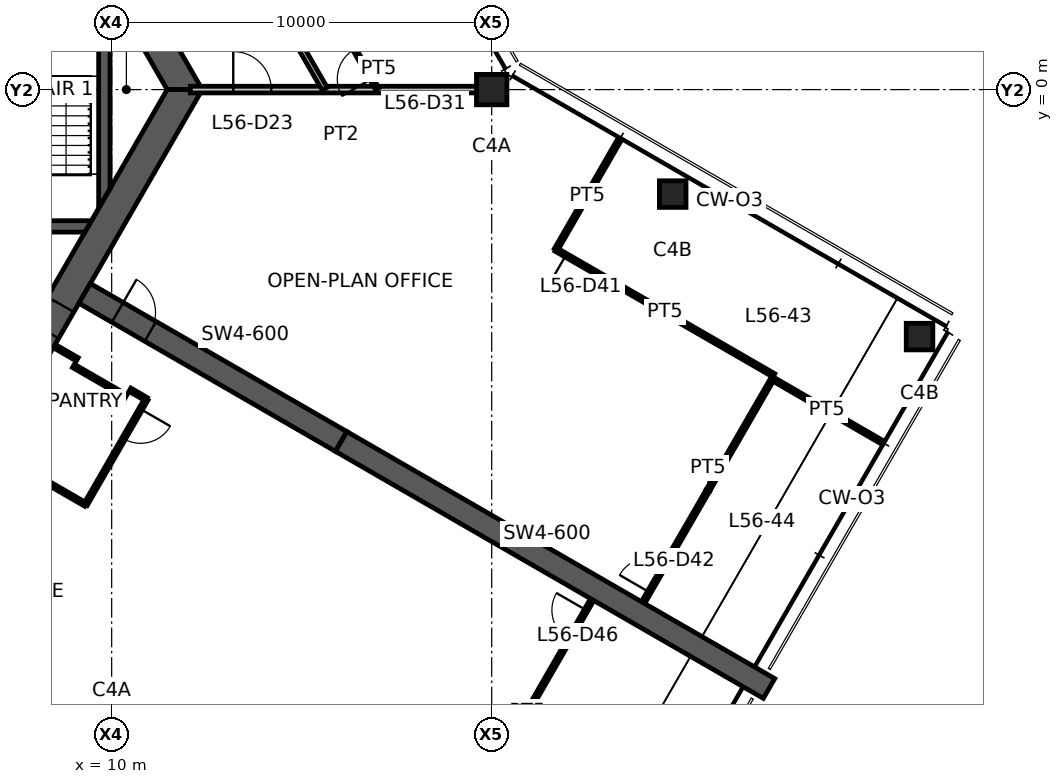
"""IFC4 building model, lengths in metres.
Left out: names, types, materials, properties, quantities, classifications, styles, units other than length and angle.
Written with IfcOpenShell. Run it as: python <this file> out.ifc"""

import sys

from ifc_helpers import new_model, si_unit, direction, frame, frame_2d, origin, origin_2d, place, context, subcontext, project, spatial, polyline, rectangle, hollow_rectangle, outline, extrude, element, fill, save


model = new_model("IFC4")
c1 = context("Model", 3, precision=1e-05, world=origin(), true_north=direction((0.0, 1.0)))
c2 = subcontext(c1, "Body", "Model", "MODEL_VIEW")
j1 = project(units=[si_unit("LENGTHUNIT", "METRE"), si_unit("PLANEANGLEUNIT", "RADIAN")], contexts=[c1])
p1 = place(None, origin())
s1 = spatial("IfcSite", under=j1, at=p1, CompositionType="ELEMENT")
p2 = place(p1, origin())
s2 = spatial("IfcBuilding", under=s1, at=p2, CompositionType="ELEMENT")
p3 = place(p2, frame((0.0, 0.0, 224.5)))
s3 = spatial("IfcBuildingStorey", under=s2, at=p3, CompositionType="ELEMENT", Elevation=224.5)
p4 = place(p3, frame((20.0, 0.0, 0.0), z_axis=(0.0, 0.0, 1.0), x_axis=(1.0, 0.0, 0.0)))
e1 = element("IfcColumn", 1, at=p4, inside=s3, PredefinedType="COLUMN", context=c2, shape_type="SweptSolid", body=[
    extrude(hollow_rectangle(XDim=0.8, YDim=0.8, WallThickness=0.04, at=origin_2d()), origin(), (0.0, 0.0, 1.0), 3.9),
])
for number, where, z_axis, x_axis in (
    (2, (24.763, -2.75, 0.0), (0.0, 0.0, 1.0), (1.0, 0.0, 0.0)),
    (3, (31.258, -6.5, 0.0), (0.0, 0.0, 1.0), (1.0, 0.0, 0.0)),
):
    element("IfcColumn", number, at=place(p3, frame(where, z_axis=z_axis, x_axis=x_axis)), inside=s3, PredefinedType="COLUMN", context=c2, shape_type="SweptSolid", body=[
        extrude(hollow_rectangle(XDim=0.7, YDim=0.7, WallThickness=0.032, at=origin_2d()), origin(), (0.0, 0.0, 1.0), 3.9),
    ])
p5 = place(p3, frame((11.922, 0.0, 0.0), z_axis=(0.0, 0.0, 1.0), x_axis=(-0.500004296715, 0.866022923061, 0.0)))
e4 = element("IfcWall", 4, at=p5, inside=s3, PredefinedType="SHEAR", context=c2, shape_type="SweptSolid", body=[
    extrude(outline(polyline([(-0.231, -0.4), (5.835, -0.4), (6.635, -0.4), (12.153, -0.4), (11.691, 0.4), (6.635, 0.4), (5.835, 0.4), (0.231, 0.4), (-0.231, -0.4)])), origin(), (0.0, 0.0, 1.0), 3.9),
])
p6 = place(p5, frame((5.835, 0.0, 0.0)))
e5 = element("IfcOpeningElement", 5, at=p6, cuts=e4, PredefinedType="OPENING", context=c2, shape_type="SweptSolid", body=[
    extrude(rectangle(XDim=0.8, YDim=2.1, at=frame_2d((0.4, 1.05))), frame((0.0, 0.41, 0.0), z_axis=(0.0, -1.0, 0.0), x_axis=(1.0, 0.0, 0.0)), (0.0, 0.0, 1.0), 0.82),
])
p7 = place(p3, frame((5.961, -10.325, 0.0), z_axis=(0.0, 0.0, 1.0), x_axis=(0.500004296715, 0.866022923061, 0.0)))
e6 = element("IfcWall", 6, at=p7, inside=s3, PredefinedType="SHEAR", context=c2, shape_type="SweptSolid", body=[
    extrude(outline(polyline([(-0.231, -0.4), (4.594, -0.4), (5.394, -0.4), (12.153, -0.4), (11.691, 0.4), (5.394, 0.4), (4.594, 0.4), (0.231, 0.4), (-0.231, -0.4)])), origin(), (0.0, 0.0, 1.0), 3.9),
])
p8 = place(p7, frame((4.594, 0.0, 0.0)))
e7 = element("IfcOpeningElement", 7, at=p8, cuts=e6, PredefinedType="OPENING", context=c2, shape_type="SweptSolid", body=[
    extrude(rectangle(XDim=0.8, YDim=2.1, at=frame_2d((0.4, 1.05))), frame((0.0, 0.41, 0.0), z_axis=(0.0, -1.0, 0.0), x_axis=(1.0, 0.0, 0.0)), (0.0, 0.0, 1.0), 0.82),
])
p9 = place(p3, frame((9.288, -5.363, 0.0), z_axis=(0.0, 0.0, 1.0), x_axis=(0.866031736626, -0.499989031036, 0.0)))
e8 = element("IfcWall", 8, at=p9, inside=s3, PredefinedType="SHEAR", context=c2, shape_type="SweptSolid", body=[
    extrude(rectangle(XDim=7.796, YDim=0.6, at=frame_2d((3.898, 0.0))), origin(), (0.0, 0.0, 1.0), 3.9),
])
p10 = place(p9, frame((1.0, 0.0, 0.0)))
e9 = element("IfcOpeningElement", 9, at=p10, cuts=e8, PredefinedType="OPENING", context=c2, shape_type="SweptSolid", body=[
    extrude(rectangle(XDim=1.0, YDim=2.1, at=frame_2d((0.5, 1.05))), frame((0.0, 0.31, 0.0), z_axis=(0.0, -1.0, 0.0), x_axis=(1.0, 0.0, 0.0)), (0.0, 0.0, 1.0), 0.62),
])
p11 = place(p3, frame((16.039, -9.26, 0.0), z_axis=(0.0, 0.0, 1.0), x_axis=(0.866024837091, -0.50000098154, 0.0)))
e10 = element("IfcWall", 10, at=p11, inside=s3, PredefinedType="SHEAR", context=c2, shape_type="SweptSolid", body=[
    extrude(rectangle(XDim=13.0, YDim=0.6, at=frame_2d((6.5, 0.0))), origin(), (0.0, 0.0, 1.0), 3.9),
])
p12 = place(p3, frame((1.45, -3.6, 0.0), z_axis=(0.0, 0.0, 1.0), x_axis=(1.0, 0.0, 0.0)))
e11 = element("IfcWall", 11, at=p12, inside=s3, PredefinedType="SHEAR", context=c2, shape_type="SweptSolid", body=[
    extrude(outline(polyline([(0.0, -0.15), (1.05, -0.15), (2.15, -0.15), (7.845, -0.15), (8.019, 0.15), (2.15, 0.15), (1.05, 0.15), (0.0, 0.15), (0.0, -0.15)])), origin(), (0.0, 0.0, 1.0), 3.9),
])
p13 = place(p12, frame((1.05, 0.0, 0.0)))
e12 = element("IfcOpeningElement", 12, at=p13, cuts=e11, PredefinedType="OPENING", context=c2, shape_type="SweptSolid", body=[
    extrude(rectangle(XDim=1.1, YDim=2.1, at=frame_2d((0.55, 1.05))), frame((0.0, 0.16, 0.0), z_axis=(0.0, -1.0, 0.0), x_axis=(1.0, 0.0, 0.0)), (0.0, 0.0, 1.0), 0.32),
])
p14 = place(p3, frame((9.808, -2.862, 0.0), z_axis=(0.0, 0.0, 1.0), x_axis=(0.0, 1.0, 0.0)))
e13 = element("IfcWall", 13, at=p14, inside=s3, PredefinedType="SHEAR", context=c2, shape_type="SweptSolid", body=[
    extrude(outline(polyline([(0.26, -0.15), (5.465, -0.15), (5.984, 0.15), (-0.26, 0.15), (0.26, -0.15)])), origin(), (0.0, 0.0, 1.0), 3.9),
])
p15 = place(p3, frame((12.07, 0.0, 0.0), z_axis=(0.0, 0.0, 1.0), x_axis=(1.0, 0.0, 0.0)))
e14 = element("IfcWall", 14, at=p15, inside=s3, PredefinedType="PARTITIONING", context=c2, shape_type="SweptSolid", body=[
    extrude(rectangle(XDim=7.93, YDim=0.175, at=frame_2d((3.965, 0.0))), origin(), (0.0, 0.0, 1.0), 3.05),
])
p16 = place(p15, frame((1.13, 0.0, 0.0)))
e15 = element("IfcOpeningElement", 15, at=p16, cuts=e14, PredefinedType="OPENING", context=c2, shape_type="SweptSolid", body=[
    extrude(rectangle(XDim=1.0, YDim=2.1, at=frame_2d((0.5, 1.05))), frame((0.0, 0.098, 0.0), z_axis=(0.0, -1.0, 0.0), x_axis=(1.0, 0.0, 0.0)), (0.0, 0.0, 1.0), 0.195),
])
p17 = place(p3, frame((11.011, 7.979, 0.0), z_axis=(0.0, 0.0, 1.0), x_axis=(0.49999917462, -0.866025880317, 0.0)))
e16 = element("IfcWall", 16, at=p17, inside=s3, PredefinedType="PARTITIONING", context=c2, shape_type="SweptSolid", body=[
    extrude(rectangle(XDim=9.19, YDim=0.15, at=frame_2d((4.595, 0.0))), origin(), (0.0, 0.0, 1.0), 2.95),
])
p18 = place(p17, frame((4.095, 0.0, 0.0)))
e17 = element("IfcOpeningElement", 17, at=p18, cuts=e16, PredefinedType="OPENING", context=c2, shape_type="SweptSolid", body=[
    extrude(rectangle(XDim=1.0, YDim=2.1, at=frame_2d((0.5, 1.05))), frame((0.0, 0.085, 0.0), z_axis=(0.0, -1.0, 0.0), x_axis=(1.0, 0.0, 0.0)), (0.0, 0.0, 1.0), 0.17),
])
p19 = place(p3, frame((16.986, 0.02, 0.0), z_axis=(0.0, 0.0, 1.0), x_axis=(-0.498096123952, 0.867121820337, 0.0)))
e18 = element("IfcWall", 18, at=p19, inside=s3, PredefinedType="PARTITIONING", context=c2, shape_type="SweptSolid", body=[
    extrude(rectangle(XDim=2.067, YDim=0.1, at=frame_2d((1.034, 0.0))), origin(), (0.0, 0.0, 1.0), 2.95),
])
p20 = place(p19, frame((0.3, 0.0, 0.0)))
e19 = element("IfcOpeningElement", 19, at=p20, cuts=e18, PredefinedType="OPENING", context=c2, shape_type="SweptSolid", body=[
    extrude(rectangle(XDim=0.9, YDim=2.1, at=frame_2d((0.45, 1.05))), frame((0.0, 0.06, 0.0), z_axis=(0.0, -1.0, 0.0), x_axis=(1.0, 0.0, 0.0)), (0.0, 0.0, 1.0), 0.12),
])
p21 = place(p3, frame((30.25, -9.266, 0.0), z_axis=(0.0, 0.0, 1.0), x_axis=(-0.865342122637, 0.501181614577, 0.0)))
e20 = element("IfcWall", 20, at=p21, inside=s3, PredefinedType="PARTITIONING", context=c2, shape_type="SweptSolid", body=[
    extrude(rectangle(XDim=3.311, YDim=0.1, at=frame_2d((1.655, 0.0))), origin(), (0.0, 0.0, 1.0), 2.95),
])
p22 = place(p3, frame((21.692, -4.21, 0.0), z_axis=(0.0, 0.0, 1.0), x_axis=(0.50002956483, 0.866008333849, 0.0)))
e21 = element("IfcWall", 21, at=p22, inside=s3, PredefinedType="PARTITIONING", context=c2, shape_type="SweptSolid", body=[
    extrude(rectangle(XDim=3.28, YDim=0.1, at=frame_2d((1.64, 0.0))), origin(), (0.0, 0.0, 1.0), 2.95),
])
p23 = place(p3, frame((27.425, -7.52, 0.0), z_axis=(0.0, 0.0, 1.0), x_axis=(-0.866030817826, 0.499990622488, 0.0)))
e22 = element("IfcWall", 22, at=p23, inside=s3, PredefinedType="PARTITIONING", context=c2, shape_type="SweptSolid", body=[
    extrude(rectangle(XDim=6.62, YDim=0.1, at=frame_2d((3.31, 0.0))), origin(), (0.0, 0.0, 1.0), 2.95),
])
p24 = place(p23, frame((5.42, 0.0, 0.0)))
e23 = element("IfcOpeningElement", 23, at=p24, cuts=e22, PredefinedType="OPENING", context=c2, shape_type="SweptSolid", body=[
    extrude(rectangle(XDim=0.9, YDim=2.1, at=frame_2d((0.45, 1.05))), frame((0.0, 0.06, 0.0), z_axis=(0.0, -1.0, 0.0), x_axis=(1.0, 0.0, 0.0)), (0.0, 0.0, 1.0), 0.12),
])
p25 = place(p3, frame((23.993, -13.483, 0.0), z_axis=(0.0, 0.0, 1.0), x_axis=(0.500522347083, 0.865723616445, 0.0)))
e24 = element("IfcWall", 24, at=p25, inside=s3, PredefinedType="PARTITIONING", context=c2, shape_type="SweptSolid", body=[
    extrude(rectangle(XDim=6.78, YDim=0.1, at=frame_2d((3.39, 0.0))), origin(), (0.0, 0.0, 1.0), 2.95),
])
p26 = place(p25, frame((0.3, 0.0, 0.0)))
e25 = element("IfcOpeningElement", 25, at=p26, cuts=e24, PredefinedType="OPENING", context=c2, shape_type="SweptSolid", body=[
    extrude(rectangle(XDim=0.9, YDim=2.1, at=frame_2d((0.45, 1.05))), frame((0.0, 0.06, 0.0), z_axis=(0.0, -1.0, 0.0), x_axis=(1.0, 0.0, 0.0)), (0.0, 0.0, 1.0), 0.12),
])
p27 = place(p3, frame((8.505, -6.758, 0.0), z_axis=(0.0, 0.0, 1.0), x_axis=(0.865958369053, -0.50011608959, 0.0)))
e26 = element("IfcWall", 26, at=p27, inside=s3, PredefinedType="PARTITIONING", context=c2, shape_type="SweptSolid", body=[
    extrude(rectangle(XDim=0.68, YDim=0.1, at=frame_2d((0.34, 0.0))), origin(), (0.0, 0.0, 1.0), 2.95),
])
p28 = place(p3, frame((8.994, -7.271, 0.0), z_axis=(0.0, 0.0, 1.0), x_axis=(0.865989903783, -0.500061482766, 0.0)))
e27 = element("IfcWall", 27, at=p28, inside=s3, PredefinedType="PARTITIONING", context=c2, shape_type="SweptSolid", body=[
    extrude(rectangle(XDim=1.6, YDim=0.1, at=frame_2d((0.8, 0.0))), origin(), (0.0, 0.0, 1.0), 2.95),
])
p29 = place(p3, frame((9.313, -10.919, 0.0), z_axis=(0.0, 0.0, 1.0), x_axis=(-0.865996920067, 0.500049332001, 0.0)))
e28 = element("IfcWall", 28, at=p29, inside=s3, PredefinedType="PARTITIONING", context=c2, shape_type="SweptSolid", body=[
    extrude(rectangle(XDim=2.78, YDim=0.1, at=frame_2d((1.39, 0.0))), origin(), (0.0, 0.0, 1.0), 2.95),
])
p30 = place(p3, frame((10.48, -7.898, 0.0), z_axis=(0.0, 0.0, 1.0), x_axis=(0.866071776036, -0.499919672301, 0.0)))
e29 = element("IfcWall", 29, at=p30, inside=s3, PredefinedType="PARTITIONING", context=c2, shape_type="SweptSolid", body=[
    extrude(rectangle(XDim=0.5, YDim=0.1, at=frame_2d((0.25, 0.0))), origin(), (0.0, 0.0, 1.0), 2.95),
])
p31 = place(p3, frame((10.913, -8.148, 0.0), z_axis=(0.0, 0.0, 1.0), x_axis=(-0.500028443584, -0.866008981251, 0.0)))
e30 = element("IfcWall", 30, at=p31, inside=s3, PredefinedType="PARTITIONING", context=c2, shape_type="SweptSolid", body=[
    extrude(rectangle(XDim=3.2, YDim=0.1, at=frame_2d((1.6, 0.0))), origin(), (0.0, 0.0, 1.0), 2.95),
])
p32 = place(p31, frame((0.3, 0.0, 0.0)))
e31 = element("IfcOpeningElement", 31, at=p32, cuts=e30, PredefinedType="OPENING", context=c2, shape_type="SweptSolid", body=[
    extrude(rectangle(XDim=0.9, YDim=2.1, at=frame_2d((0.45, 1.05))), frame((0.0, 0.06, 0.0), z_axis=(0.0, -1.0, 0.0), x_axis=(1.0, 0.0, 0.0)), (0.0, 0.0, 1.0), 0.12),
])
p33 = place(p3, frame((19.248, -19.311, 0.0), z_axis=(0.0, 0.0, 1.0), x_axis=(0.499489671712, 0.866319841544, 0.0)))
e32 = element("IfcWall", 32, at=p33, inside=s3, PredefinedType="PARTITIONING", context=c2, shape_type="SweptSolid", body=[
    extrude(rectangle(XDim=6.78, YDim=0.1, at=frame_2d((3.39, 0.0))), origin(), (0.0, 0.0, 1.0), 2.95),
])
p34 = place(p33, frame((5.58, 0.0, 0.0)))
e33 = element("IfcOpeningElement", 33, at=p34, cuts=e32, PredefinedType="OPENING", context=c2, shape_type="SweptSolid", body=[
    extrude(rectangle(XDim=0.9, YDim=2.1, at=frame_2d((0.45, 1.05))), frame((0.0, 0.06, 0.0), z_axis=(0.0, -1.0, 0.0), x_axis=(1.0, 0.0, 0.0)), (0.0, 0.0, 1.0), 0.12),
])
p35 = place(p8, origin())
e34 = element("IfcDoor", 34, at=p35, inside=s3, OperationType="SINGLE_SWING_LEFT", PredefinedType="DOOR", context=c2, shape_type="SweptSolid", body=[
    extrude(rectangle(XDim=0.8, YDim=2.1, at=frame_2d((0.4, 1.05))), frame((0.0, 0.025, 0.0), z_axis=(0.0, -1.0, 0.0), x_axis=(1.0, 0.0, 0.0)), (0.0, 0.0, 1.0), 0.05),
])
fill(e7, e34)
p36 = place(p10, origin())
e35 = element("IfcDoor", 35, at=p36, inside=s3, OperationType="SINGLE_SWING_LEFT", PredefinedType="DOOR", context=c2, shape_type="SweptSolid", body=[
    extrude(rectangle(XDim=1.0, YDim=2.1, at=frame_2d((0.5, 1.05))), frame((0.0, 0.025, 0.0), z_axis=(0.0, -1.0, 0.0), x_axis=(1.0, 0.0, 0.0)), (0.0, 0.0, 1.0), 0.05),
])
fill(e9, e35)
p37 = place(p16, origin())
e36 = element("IfcDoor", 36, at=p37, inside=s3, OperationType="SINGLE_SWING_LEFT", PredefinedType="DOOR", context=c2, shape_type="SweptSolid", body=[
    extrude(rectangle(XDim=1.0, YDim=2.1, at=frame_2d((0.5, 1.05))), frame((0.0, 0.025, 0.0), z_axis=(0.0, -1.0, 0.0), x_axis=(1.0, 0.0, 0.0)), (0.0, 0.0, 1.0), 0.05),
])
fill(e15, e36)
p38 = place(p20, origin())
e37 = element("IfcDoor", 37, at=p38, inside=s3, OperationType="SINGLE_SWING_LEFT", PredefinedType="DOOR", context=c2, shape_type="SweptSolid", body=[
    extrude(rectangle(XDim=0.9, YDim=2.1, at=frame_2d((0.45, 1.05))), frame((0.0, 0.025, 0.0), z_axis=(0.0, -1.0, 0.0), x_axis=(1.0, 0.0, 0.0)), (0.0, 0.0, 1.0), 0.05),
])
fill(e19, e37)
p39 = place(p24, origin())
e38 = element("IfcDoor", 38, at=p39, inside=s3, OperationType="SINGLE_SWING_RIGHT", PredefinedType="DOOR", context=c2, shape_type="SweptSolid", body=[
    extrude(rectangle(XDim=0.9, YDim=2.1, at=frame_2d((0.45, 1.05))), frame((0.0, 0.025, 0.0), z_axis=(0.0, -1.0, 0.0), x_axis=(1.0, 0.0, 0.0)), (0.0, 0.0, 1.0), 0.05),
])
fill(e23, e38)
p40 = place(p26, origin())
e39 = element("IfcDoor", 39, at=p40, inside=s3, OperationType="SINGLE_SWING_LEFT", PredefinedType="DOOR", context=c2, shape_type="SweptSolid", body=[
    extrude(rectangle(XDim=0.9, YDim=2.1, at=frame_2d((0.45, 1.05))), frame((0.0, 0.025, 0.0), z_axis=(0.0, -1.0, 0.0), x_axis=(1.0, 0.0, 0.0)), (0.0, 0.0, 1.0), 0.05),
])
fill(e25, e39)
p41 = place(p32, origin())
e40 = element("IfcDoor", 40, at=p41, inside=s3, OperationType="SINGLE_SWING_LEFT", PredefinedType="DOOR", context=c2, shape_type="SweptSolid", body=[
    extrude(rectangle(XDim=0.9, YDim=2.1, at=frame_2d((0.45, 1.05))), frame((0.0, 0.025, 0.0), z_axis=(0.0, -1.0, 0.0), x_axis=(1.0, 0.0, 0.0)), (0.0, 0.0, 1.0), 0.05),
])
fill(e31, e40)
p42 = place(p34, origin())
e41 = element("IfcDoor", 41, at=p42, inside=s3, OperationType="SINGLE_SWING_RIGHT", PredefinedType="DOOR", context=c2, shape_type="SweptSolid", body=[
    extrude(rectangle(XDim=0.9, YDim=2.1, at=frame_2d((0.45, 1.05))), frame((0.0, 0.025, 0.0), z_axis=(0.0, -1.0, 0.0), x_axis=(1.0, 0.0, 0.0)), (0.0, 0.0, 1.0), 0.05),
])
fill(e33, e41)
save(model, sys.argv[1])
